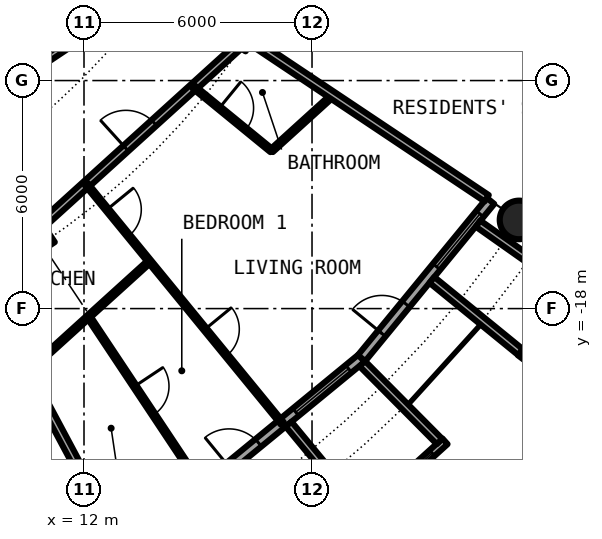
"""IFC4 building model, lengths in metres.
Left out: names, types, materials, properties, quantities, classifications, styles, units other than length and angle.
Written with IfcOpenShell. Run it as: python <this file> out.ifc"""

import sys

from ifc_helpers import new_model, si_unit, direction, frame, frame_2d, origin, origin_2d, place, context, subcontext, project, spatial, rectangle, circle, hollow_circle, i_section, extrude, element, fill, save


model = new_model("IFC4")
c1 = context("Model", 3, precision=1e-05, world=origin(), true_north=direction((0.0, 1.0)))
c2 = subcontext(c1, "Body", "Model", "MODEL_VIEW")
j1 = project(units=[si_unit("LENGTHUNIT", "METRE"), si_unit("PLANEANGLEUNIT", "RADIAN")], contexts=[c1])
p1 = place(None, origin())
s1 = spatial("IfcSite", under=j1, at=p1, CompositionType="ELEMENT")
p2 = place(p1, origin())
s2 = spatial("IfcBuilding", under=s1, at=p2, CompositionType="ELEMENT")
p3 = place(p2, frame((0.0, 0.0, 31.95)))
s3 = spatial("IfcBuildingStorey", under=s2, at=p3, CompositionType="ELEMENT", Elevation=31.95)
p4 = place(p3, frame((23.448, -15.667, 0.0), z_axis=(0.0, 0.0, 1.0), x_axis=(1.0, 0.0, 0.0)))
e1 = element("IfcColumn", 1, at=p4, inside=s3, PredefinedType="COLUMN", context=c2, shape_type="SweptSolid", body=[
    extrude(hollow_circle(Radius=0.508, WallThickness=0.05, at=origin_2d()), origin(), (0.0, 0.0, 1.0), 3.05),
])
p5 = place(p3, frame((10.889, -16.297, 0.0), z_axis=(0.0, 0.0, 1.0), x_axis=(0.55557023302, -0.831469612303, 0.0)))
e2 = element("IfcColumn", 2, at=p5, inside=s3, PredefinedType="COLUMN", context=c2, shape_type="SweptSolid", body=[
    extrude(i_section(OverallWidth=0.305, OverallDepth=0.62, WebThickness=0.021, FlangeThickness=0.04, FilletRadius=0.027, at=origin_2d()), origin(), (0.0, 0.0, 1.0), 3.05),
])
p6 = place(p3, frame((15.167, -22.699, 0.0), z_axis=(0.0, 0.0, 1.0), x_axis=(0.773019449054, 0.634382322723, 0.0)))
e3 = element("IfcWall", 3, at=p6, inside=s3, PredefinedType="SOLIDWALL", context=c2, shape_type="SweptSolid", body=[
    extrude(rectangle(XDim=5.352, YDim=0.25, at=frame_2d((2.676, 0.0))), origin(), (0.0, 0.0, 1.0), 2.7),
])
p7 = place(p6, frame((0.841, 0.0, 0.0)))
e4 = element("IfcOpeningElement", 4, at=p7, cuts=e3, PredefinedType="OPENING", context=c2, shape_type="SweptSolid", body=[
    extrude(rectangle(XDim=1.0, YDim=2.2, at=frame_2d((0.5, 1.1))), frame((0.0, 0.135, 0.0), z_axis=(0.0, -1.0, 0.0), x_axis=(1.0, 0.0, 0.0)), (0.0, 0.0, 1.0), 0.27),
])
p8 = place(p6, frame((3.111, 0.0, 0.3)))
e5 = element("IfcOpeningElement", 5, at=p8, cuts=e3, PredefinedType="OPENING", context=c2, shape_type="SweptSolid", body=[
    extrude(rectangle(XDim=1.8, YDim=2.1, at=frame_2d((0.9, 1.05))), frame((0.0, 0.135, 0.0), z_axis=(0.0, -1.0, 0.0), x_axis=(1.0, 0.0, 0.0)), (0.0, 0.0, 1.0), 0.27),
])
p9 = place(p3, frame((19.282, -23.503, -0.03), z_axis=(0.0, 0.0, 1.0), x_axis=(0.740998365753, 0.671506829416, 0.0)))
e6 = element("IfcWall", 6, at=p9, inside=s3, PredefinedType="SOLIDWALL", context=c2, shape_type="SweptSolid", body=[
    extrude(rectangle(XDim=2.993, YDim=0.2, at=frame_2d((1.497, 0.0))), origin(), (0.0, 0.0, 1.0), 2.73),
])
p10 = place(p9, frame((0.457, 0.0, 0.33)))
e7 = element("IfcOpeningElement", 7, at=p10, cuts=e6, PredefinedType="OPENING", context=c2, shape_type="SweptSolid", body=[
    extrude(circle(Radius=1.04, at=frame_2d((1.04, 1.04))), frame((0.0, 0.11, 0.0), z_axis=(0.0, -1.0, 0.0), x_axis=(1.0, 0.0, 0.0)), (0.0, 0.0, 1.0), 0.22),
])
p11 = place(p3, frame((17.384, -21.041, -0.03), z_axis=(0.0, 0.0, 1.0), x_axis=(0.63709551667, -0.770784861449, 0.0)))
e8 = element("IfcWall", 8, at=p11, inside=s3, PredefinedType="SOLIDWALL", context=c2, shape_type="SweptSolid", body=[
    extrude(rectangle(XDim=3.006, YDim=0.2, at=frame_2d((1.503, 0.0))), origin(), (0.0, 0.0, 1.0), 2.73),
])
p12 = place(p3, frame((19.323, -19.45, -0.03), z_axis=(0.0, 0.0, 1.0), x_axis=(0.704476739375, -0.709727076896, 0.0)))
e9 = element("IfcWall", 9, at=p12, inside=s3, PredefinedType="SOLIDWALL", context=c2, shape_type="SweptSolid", body=[
    extrude(rectangle(XDim=2.883, YDim=0.2, at=frame_2d((1.441, 0.0))), origin(), (0.0, 0.0, 1.0), 2.73),
])
p13 = place(p3, frame((19.304, -19.304, 0.0), z_axis=(0.0, 0.0, 1.0), x_axis=(0.634382322723, 0.773019449054, 0.0)))
e10 = element("IfcWall", 10, at=p13, inside=s3, PredefinedType="SOLIDWALL", context=c2, shape_type="SweptSolid", body=[
    extrude(rectangle(XDim=5.352, YDim=0.25, at=frame_2d((2.676, 0.0))), origin(), (0.0, 0.0, 1.0), 2.7),
])
p14 = place(p13, frame((0.841, 0.0, 0.0)))
e11 = element("IfcOpeningElement", 11, at=p14, cuts=e10, PredefinedType="OPENING", context=c2, shape_type="SweptSolid", body=[
    extrude(rectangle(XDim=1.0, YDim=2.2, at=frame_2d((0.5, 1.1))), frame((0.0, 0.135, 0.0), z_axis=(0.0, -1.0, 0.0), x_axis=(1.0, 0.0, 0.0)), (0.0, 0.0, 1.0), 0.27),
])
p15 = place(p13, frame((3.111, 0.0, 0.3)))
e12 = element("IfcOpeningElement", 12, at=p15, cuts=e10, PredefinedType="OPENING", context=c2, shape_type="SweptSolid", body=[
    extrude(rectangle(XDim=1.8, YDim=2.1, at=frame_2d((0.9, 1.05))), frame((0.0, 0.135, 0.0), z_axis=(0.0, -1.0, 0.0), x_axis=(1.0, 0.0, 0.0)), (0.0, 0.0, 1.0), 0.27),
])
p16 = place(p3, frame((23.497, -19.289, -0.03), z_axis=(0.0, 0.0, 1.0), x_axis=(0.60418752353, 0.796842165306, 0.0)))
e13 = element("IfcWall", 13, at=p16, inside=s3, PredefinedType="SOLIDWALL", context=c2, shape_type="SweptSolid", body=[
    extrude(rectangle(XDim=2.337, YDim=0.2, at=frame_2d((1.168, 0.0))), origin(), (0.0, 0.0, 1.0), 2.73),
])
p17 = place(p16, frame((0.128, 0.0, 0.33)))
e14 = element("IfcOpeningElement", 14, at=p17, cuts=e13, PredefinedType="OPENING", context=c2, shape_type="SweptSolid", body=[
    extrude(circle(Radius=1.04, at=frame_2d((1.04, 1.04))), frame((0.0, 0.11, 0.0), z_axis=(0.0, -1.0, 0.0), x_axis=(1.0, 0.0, 0.0)), (0.0, 0.0, 1.0), 0.22),
])
p18 = place(p3, frame((21.155, -17.246, -0.03), z_axis=(0.0, 0.0, 1.0), x_axis=(0.775179004516, -0.631741648902, 0.0)))
e15 = element("IfcWall", 15, at=p18, inside=s3, PredefinedType="SOLIDWALL", context=c2, shape_type="SweptSolid", body=[
    extrude(rectangle(XDim=3.006, YDim=0.2, at=frame_2d((1.503, 0.0))), origin(), (0.0, 0.0, 1.0), 2.73),
])
p19 = place(p3, frame((22.37, -15.765, -0.03), z_axis=(0.0, 0.0, 1.0), x_axis=(0.817256123454, -0.576274612209, 0.0)))
e16 = element("IfcWall", 16, at=p19, inside=s3, PredefinedType="SOLIDWALL", context=c2, shape_type="SweptSolid", body=[
    extrude(rectangle(XDim=2.933, YDim=0.2, at=frame_2d((1.466, 0.0))), origin(), (0.0, 0.0, 1.0), 2.73),
])
p20 = place(p3, frame((10.513, -19.668, 0.0), z_axis=(0.0, 0.0, 1.0), x_axis=(0.74092137325, 0.671591779775, 0.0)))
e17 = element("IfcWall", 17, at=p20, inside=s3, PredefinedType="PARTITIONING", context=c2, shape_type="SweptSolid", body=[
    extrude(rectangle(XDim=4.342, YDim=0.1, at=frame_2d((2.171, 0.0))), origin(), (0.0, 0.0, 1.0), 2.7),
])
p21 = place(p3, frame((16.936, -13.845, 0.0), z_axis=(0.0, 0.0, 1.0), x_axis=(0.740836325503, 0.671685595212, 0.0)))
e18 = element("IfcWall", 18, at=p21, inside=s3, PredefinedType="PARTITIONING", context=c2, shape_type="SweptSolid", body=[
    extrude(rectangle(XDim=2.168, YDim=0.1, at=frame_2d((1.084, 0.0))), origin(), (0.0, 0.0, 1.0), 2.7),
])
p22 = place(p3, frame((9.239, -17.286, 0.0), z_axis=(0.0, 0.0, 1.0), x_axis=(0.74089212117, 0.671624050186, 0.0)))
e19 = element("IfcWall", 19, at=p22, inside=s3, PredefinedType="PARTITIONING", context=c2, shape_type="SweptSolid", body=[
    extrude(rectangle(XDim=9.368, YDim=0.2, at=frame_2d((4.684, 0.0))), origin(), (0.0, 0.0, 1.0), 2.38),
])
p23 = place(p22, frame((5.215, 0.0, 0.0)))
e20 = element("IfcOpeningElement", 20, at=p23, cuts=e19, PredefinedType="OPENING", context=c2, shape_type="SweptSolid", body=[
    extrude(rectangle(XDim=1.0, YDim=2.3, at=frame_2d((0.5, 1.15))), frame((0.0, 0.11, 0.0), z_axis=(0.0, -1.0, 0.0), x_axis=(1.0, 0.0, 0.0)), (0.0, 0.0, 1.0), 0.22),
])
p24 = place(p3, frame((3.297, -16.575, 0.0), z_axis=(0.0, 0.0, 1.0), x_axis=(0.831561346449, 0.555432918625, 0.0)))
e21 = element("IfcWall", 21, at=p24, inside=s3, PredefinedType="PARTITIONING", context=c2, shape_type="SweptSolid", body=[
    extrude(rectangle(XDim=12.914, YDim=0.2, at=frame_2d((6.457, 0.0))), origin(), (0.0, 0.0, 1.0), 2.7),
])
p25 = place(p24, frame((4.352, 0.0, 0.0)))
e22 = element("IfcOpeningElement", 22, at=p25, cuts=e21, PredefinedType="OPENING", context=c2, shape_type="SweptSolid", body=[
    extrude(rectangle(XDim=1.0, YDim=2.3, at=frame_2d((0.5, 1.15))), frame((0.0, 0.11, 0.0), z_axis=(0.0, -1.0, 0.0), x_axis=(1.0, 0.0, 0.0)), (0.0, 0.0, 1.0), 0.22),
])
p26 = place(p3, frame((9.239, -17.286, 0.0), z_axis=(0.0, 0.0, 1.0), x_axis=(0.471439510802, -0.881898399848, 0.0)))
e23 = element("IfcWall", 23, at=p26, inside=s3, PredefinedType="PARTITIONING", context=c2, shape_type="SweptSolid", body=[
    extrude(rectangle(XDim=7.575, YDim=0.2, at=frame_2d((3.787, 0.0))), origin(), (0.0, 0.0, 1.0), 2.7),
])
p27 = place(p3, frame((12.062, -14.727, 0.0), z_axis=(0.0, 0.0, 1.0), x_axis=(0.633664062855, -0.773608334654, 0.0)))
e24 = element("IfcWall", 24, at=p27, inside=s3, PredefinedType="PARTITIONING", context=c2, shape_type="SweptSolid", body=[
    extrude(rectangle(XDim=8.138, YDim=0.1, at=frame_2d((4.069, 0.0))), origin(), (0.0, 0.0, 1.0), 2.7),
])
p28 = place(p27, frame((0.861, 0.0, 0.0)))
e25 = element("IfcOpeningElement", 25, at=p28, cuts=e24, PredefinedType="OPENING", context=c2, shape_type="SweptSolid", body=[
    extrude(rectangle(XDim=0.9, YDim=2.3, at=frame_2d((0.45, 1.15))), frame((0.0, 0.06, 0.0), z_axis=(0.0, -1.0, 0.0), x_axis=(1.0, 0.0, 0.0)), (0.0, 0.0, 1.0), 0.12),
])
p29 = place(p27, frame((4.931, 0.0, 0.0)))
e26 = element("IfcOpeningElement", 26, at=p29, cuts=e24, PredefinedType="OPENING", context=c2, shape_type="SweptSolid", body=[
    extrude(rectangle(XDim=0.9, YDim=2.3, at=frame_2d((0.45, 1.15))), frame((0.0, 0.06, 0.0), z_axis=(0.0, -1.0, 0.0), x_axis=(1.0, 0.0, 0.0)), (0.0, 0.0, 1.0), 0.12),
])
p30 = place(p3, frame((12.118, -18.211, 0.0), z_axis=(0.0, 0.0, 1.0), x_axis=(0.553913391217, -0.832574294, 0.0)))
e27 = element("IfcWall", 27, at=p30, inside=s3, PredefinedType="PARTITIONING", context=c2, shape_type="SweptSolid", body=[
    extrude(rectangle(XDim=5.301, YDim=0.1, at=frame_2d((2.65, 0.0))), origin(), (0.0, 0.0, 1.0), 2.7),
])
p31 = place(p30, frame((2.2, 0.0, 0.0)))
e28 = element("IfcOpeningElement", 28, at=p31, cuts=e27, PredefinedType="OPENING", context=c2, shape_type="SweptSolid", body=[
    extrude(rectangle(XDim=0.9, YDim=2.3, at=frame_2d((0.45, 1.15))), frame((0.0, 0.06, 0.0), z_axis=(0.0, -1.0, 0.0), x_axis=(1.0, 0.0, 0.0)), (0.0, 0.0, 1.0), 0.12),
])
p32 = place(p3, frame((14.885, -12.168, 0.0), z_axis=(0.0, 0.0, 1.0), x_axis=(0.774162545943, -0.632986850147, 0.0)))
e29 = element("IfcWall", 29, at=p32, inside=s3, PredefinedType="PARTITIONING", context=c2, shape_type="SweptSolid", body=[
    extrude(rectangle(XDim=2.649, YDim=0.1, at=frame_2d((1.325, 0.0))), origin(), (0.0, 0.0, 1.0), 2.7),
])
p33 = place(p32, frame((0.875, 0.0, 0.0)))
e30 = element("IfcOpeningElement", 30, at=p33, cuts=e29, PredefinedType="OPENING", context=c2, shape_type="SweptSolid", body=[
    extrude(rectangle(XDim=0.9, YDim=2.3, at=frame_2d((0.45, 1.15))), frame((0.0, 0.06, 0.0), z_axis=(0.0, -1.0, 0.0), x_axis=(1.0, 0.0, 0.0)), (0.0, 0.0, 1.0), 0.12),
])
p34 = place(p3, frame((16.555, -11.061, 0.0), z_axis=(0.0, 0.0, 1.0), x_axis=(0.831507055747, -0.555514190857, 0.0)))
e31 = element("IfcWall", 31, at=p34, inside=s3, PredefinedType="PARTITIONING", context=c2, shape_type="SweptSolid", body=[
    extrude(rectangle(XDim=7.265, YDim=0.2, at=frame_2d((3.633, 0.0))), origin(), (0.0, 0.0, 1.0), 2.7),
])
p35 = place(p7, origin())
e32 = element("IfcDoor", 32, at=p35, inside=s3, OperationType="SINGLE_SWING_LEFT", PredefinedType="DOOR", context=c2, shape_type="SweptSolid", body=[
    extrude(rectangle(XDim=1.0, YDim=2.2, at=frame_2d((0.5, 1.1))), frame((0.0, 0.025, 0.0), z_axis=(0.0, -1.0, 0.0), x_axis=(1.0, 0.0, 0.0)), (0.0, 0.0, 1.0), 0.05),
])
fill(e4, e32)
p36 = place(p8, origin())
e33 = element("IfcWindow", 33, at=p36, inside=s3, PartitioningType="SINGLE_PANEL", PredefinedType="WINDOW", context=c2, shape_type="SweptSolid", body=[
    extrude(rectangle(XDim=1.8, YDim=2.1, at=frame_2d((0.9, 1.05))), frame((0.0, 0.03, 0.0), z_axis=(0.0, -1.0, 0.0), x_axis=(1.0, 0.0, 0.0)), (0.0, 0.0, 1.0), 0.06),
])
fill(e5, e33)
p37 = place(p10, origin())
e34 = element("IfcWindow", 34, at=p37, inside=s3, PartitioningType="SINGLE_PANEL", PredefinedType="WINDOW", context=c2, shape_type="SweptSolid", body=[
    extrude(circle(Radius=1.04, at=frame_2d((1.04, 1.04))), frame((0.0, 0.03, 0.0), z_axis=(0.0, -1.0, 0.0), x_axis=(1.0, 0.0, 0.0)), (0.0, 0.0, 1.0), 0.06),
])
fill(e7, e34)
p38 = place(p14, origin())
e35 = element("IfcDoor", 35, at=p38, inside=s3, OperationType="SINGLE_SWING_LEFT", PredefinedType="DOOR", context=c2, shape_type="SweptSolid", body=[
    extrude(rectangle(XDim=1.0, YDim=2.2, at=frame_2d((0.5, 1.1))), frame((0.0, 0.025, 0.0), z_axis=(0.0, -1.0, 0.0), x_axis=(1.0, 0.0, 0.0)), (0.0, 0.0, 1.0), 0.05),
])
fill(e11, e35)
p39 = place(p15, origin())
e36 = element("IfcWindow", 36, at=p39, inside=s3, PartitioningType="SINGLE_PANEL", PredefinedType="WINDOW", context=c2, shape_type="SweptSolid", body=[
    extrude(rectangle(XDim=1.8, YDim=2.1, at=frame_2d((0.9, 1.05))), frame((0.0, 0.03, 0.0), z_axis=(0.0, -1.0, 0.0), x_axis=(1.0, 0.0, 0.0)), (0.0, 0.0, 1.0), 0.06),
])
fill(e12, e36)
p40 = place(p23, origin())
e37 = element("IfcDoor", 37, at=p40, inside=s3, OperationType="SINGLE_SWING_RIGHT", PredefinedType="DOOR", context=c2, shape_type="SweptSolid", body=[
    extrude(rectangle(XDim=1.0, YDim=2.3, at=frame_2d((0.5, 1.15))), frame((0.0, 0.025, 0.0), z_axis=(0.0, -1.0, 0.0), x_axis=(1.0, 0.0, 0.0)), (0.0, 0.0, 1.0), 0.05),
])
fill(e20, e37)
p41 = place(p33, origin())
e38 = element("IfcDoor", 38, at=p41, inside=s3, OperationType="SINGLE_SWING_RIGHT", PredefinedType="DOOR", context=c2, shape_type="SweptSolid", body=[
    extrude(rectangle(XDim=0.9, YDim=2.3, at=frame_2d((0.45, 1.15))), frame((0.0, 0.025, 0.0), z_axis=(0.0, -1.0, 0.0), x_axis=(1.0, 0.0, 0.0)), (0.0, 0.0, 1.0), 0.05),
])
fill(e30, e38)
p42 = place(p28, origin())
e39 = element("IfcDoor", 39, at=p42, inside=s3, OperationType="SINGLE_SWING_LEFT", PredefinedType="DOOR", context=c2, shape_type="SweptSolid", body=[
    extrude(rectangle(XDim=0.9, YDim=2.3, at=frame_2d((0.45, 1.15))), frame((0.0, 0.025, 0.0), z_axis=(0.0, -1.0, 0.0), x_axis=(1.0, 0.0, 0.0)), (0.0, 0.0, 1.0), 0.05),
])
fill(e25, e39)
p43 = place(p29, origin())
e40 = element("IfcDoor", 40, at=p43, inside=s3, OperationType="SINGLE_SWING_RIGHT", PredefinedType="DOOR", context=c2, shape_type="SweptSolid", body=[
    extrude(rectangle(XDim=0.9, YDim=2.3, at=frame_2d((0.45, 1.15))), frame((0.0, 0.025, 0.0), z_axis=(0.0, -1.0, 0.0), x_axis=(1.0, 0.0, 0.0)), (0.0, 0.0, 1.0), 0.05),
])
fill(e26, e40)
p44 = place(p31, origin())
e41 = element("IfcDoor", 41, at=p44, inside=s3, OperationType="SINGLE_SWING_RIGHT", PredefinedType="DOOR", context=c2, shape_type="SweptSolid", body=[
    extrude(rectangle(XDim=0.9, YDim=2.3, at=frame_2d((0.45, 1.15))), frame((0.0, 0.025, 0.0), z_axis=(0.0, -1.0, 0.0), x_axis=(1.0, 0.0, 0.0)), (0.0, 0.0, 1.0), 0.05),
])
fill(e28, e41)
save(model, sys.argv[1])
